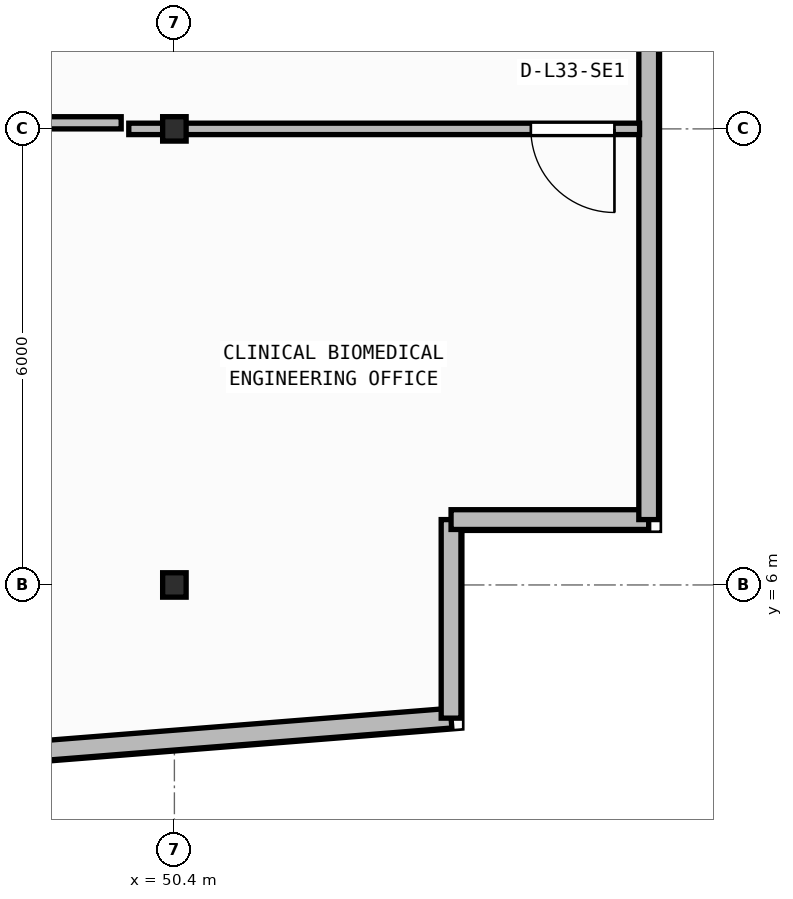
"""IFC4 building model, lengths in metres.
Left out: names, types, materials, properties, quantities, classifications, styles, units other than length and angle.
Written with IfcOpenShell. Run it as: python <this file> out.ifc"""

import sys

from ifc_helpers import new_model, si_unit, direction, frame, frame_2d, origin, origin_2d, place, context, subcontext, project, spatial, rectangle, i_section, extrude, element, fill, save


model = new_model("IFC4")
c1 = context("Model", 3, precision=1e-05, world=origin(), true_north=direction((0.0, 1.0)))
c2 = subcontext(c1, "Body", "Model", "MODEL_VIEW")
j1 = project(units=[si_unit("LENGTHUNIT", "METRE"), si_unit("PLANEANGLEUNIT", "RADIAN")], contexts=[c1])
p1 = place(None, origin())
s1 = spatial("IfcSite", under=j1, at=p1, CompositionType="ELEMENT")
p2 = place(p1, origin())
s2 = spatial("IfcBuilding", under=s1, at=p2, CompositionType="ELEMENT")
p3 = place(p2, frame((0.0, 0.0, 134.95)))
s3 = spatial("IfcBuildingStorey", under=s2, at=p3, CompositionType="ELEMENT", Elevation=134.95)
for number, where, z_axis, x_axis in (
    (1, (50.4, 6.0, 0.0), (0.0, 0.0, 1.0), (1.0, 0.0, 0.0)),
    (2, (50.4, 12.0, 0.0), (0.0, 0.0, 1.0), (1.0, 0.0, 0.0)),
):
    element("IfcColumn", number, at=place(p3, frame(where, z_axis=z_axis, x_axis=x_axis)), inside=s3, PredefinedType="COLUMN", context=c2, shape_type="SweptSolid", body=[
        extrude(i_section(OverallWidth=0.309, OverallDepth=0.321, WebThickness=0.014, FlangeThickness=0.022, FilletRadius=0.017, at=origin_2d()), origin(), (0.0, 0.0, 1.0), 3.95),
    ])
p4 = place(p3, frame((2.76, 0.173, 0.0), z_axis=(0.0, 0.0, 1.0), x_axis=(0.996857931723, 0.079210251617, 0.0)))
e3 = element("IfcWall", 3, at=p4, inside=s3, PredefinedType="STANDARD", context=c2, shape_type="SweptSolid", body=[
    extrude(rectangle(XDim=51.442, YDim=0.26, at=frame_2d((25.721, 0.0))), origin(), (0.0, 0.0, 1.0), 3.71),
])
p5 = place(p4, frame((24.521, 0.0, 0.9)))
e4 = element("IfcOpeningElement", 4, at=p5, cuts=e3, PredefinedType="OPENING", context=c2, shape_type="SweptSolid", body=[
    extrude(rectangle(XDim=2.4, YDim=1.65, at=frame_2d((1.2, 0.825))), frame((0.0, 0.14, 0.0), z_axis=(0.0, -1.0, 0.0), x_axis=(1.0, 0.0, 0.0)), (0.0, 0.0, 1.0), 0.28),
])
p6 = place(p3, frame((54.04, 4.248, 0.0), z_axis=(0.0, 0.0, 1.0), x_axis=(0.0, 1.0, 0.0)))
e5 = element("IfcWall", 5, at=p6, inside=s3, PredefinedType="STANDARD", context=c2, shape_type="SweptSolid", body=[
    extrude(rectangle(XDim=2.612, YDim=0.26, at=frame_2d((1.306, 0.0))), origin(), (0.0, 0.0, 1.0), 3.71),
])
p7 = place(p3, frame((54.04, 6.86, 0.0), z_axis=(0.0, 0.0, 1.0), x_axis=(1.0, 0.0, 0.0)))
e6 = element("IfcWall", 6, at=p7, inside=s3, PredefinedType="STANDARD", context=c2, shape_type="SweptSolid", body=[
    extrude(rectangle(XDim=2.6, YDim=0.26, at=frame_2d((1.3, 0.0))), origin(), (0.0, 0.0, 1.0), 3.71),
])
p8 = place(p3, frame((56.64, 6.86, 0.0), z_axis=(0.0, 0.0, 1.0), x_axis=(0.0, 1.0, 0.0)))
e7 = element("IfcWall", 7, at=p8, inside=s3, PredefinedType="STANDARD", context=c2, shape_type="SweptSolid", body=[
    extrude(rectangle(XDim=23.48, YDim=0.26, at=frame_2d((11.74, 0.0))), origin(), (0.0, 0.0, 1.0), 3.71),
])
p9 = place(p8, frame((9.24, 0.0, 0.0)))
e8 = element("IfcOpeningElement", 8, at=p9, cuts=e7, PredefinedType="OPENING", context=c2, shape_type="SweptSolid", body=[
    extrude(rectangle(XDim=1.3, YDim=2.15, at=frame_2d((0.65, 1.075))), frame((0.0, 0.14, 0.0), z_axis=(0.0, -1.0, 0.0), x_axis=(1.0, 0.0, 0.0)), (0.0, 0.0, 1.0), 0.28),
])
p10 = place(p3, frame((56.52, 12.0, 0.0), z_axis=(0.0, 0.0, 1.0), x_axis=(-1.0, 0.0, 0.0)))
e9 = element("IfcWall", 9, at=p10, inside=s3, PredefinedType="PARTITIONING", context=c2, shape_type="SweptSolid", body=[
    extrude(rectangle(XDim=6.72, YDim=0.15, at=frame_2d((3.36, 0.0))), origin(), (0.0, 0.0, 1.0), 3.083),
])
p11 = place(p10, frame((0.331, 0.0, 0.0)))
e10 = element("IfcOpeningElement", 10, at=p11, cuts=e9, PredefinedType="OPENING", context=c2, shape_type="SweptSolid", body=[
    extrude(rectangle(XDim=1.1, YDim=2.1, at=frame_2d((0.55, 1.05))), frame((0.0, 0.085, 0.0), z_axis=(0.0, -1.0, 0.0), x_axis=(1.0, 0.0, 0.0)), (0.0, 0.0, 1.0), 0.17),
])
p12 = place(p3, frame((46.689, 12.08, 0.0), z_axis=(0.0, 0.0, 1.0), x_axis=(1.0, 0.0, 0.0)))
e11 = element("IfcWall", 11, at=p12, inside=s3, PredefinedType="PARTITIONING", context=c2, shape_type="SweptSolid", body=[
    extrude(rectangle(XDim=3.011, YDim=0.16, at=frame_2d((1.505, 0.0))), origin(), (0.0, 0.0, 1.0), 3.083),
])
p13 = place(p11, origin())
e12 = element("IfcDoor", 12, at=p13, inside=s3, OperationType="SINGLE_SWING_LEFT", PredefinedType="DOOR", context=c2, shape_type="SweptSolid", body=[
    extrude(rectangle(XDim=1.1, YDim=2.1, at=frame_2d((0.55, 1.05))), frame((0.0, 0.025, 0.0), z_axis=(0.0, -1.0, 0.0), x_axis=(1.0, 0.0, 0.0)), (0.0, 0.0, 1.0), 0.05),
])
fill(e10, e12)
save(model, sys.argv[1])
